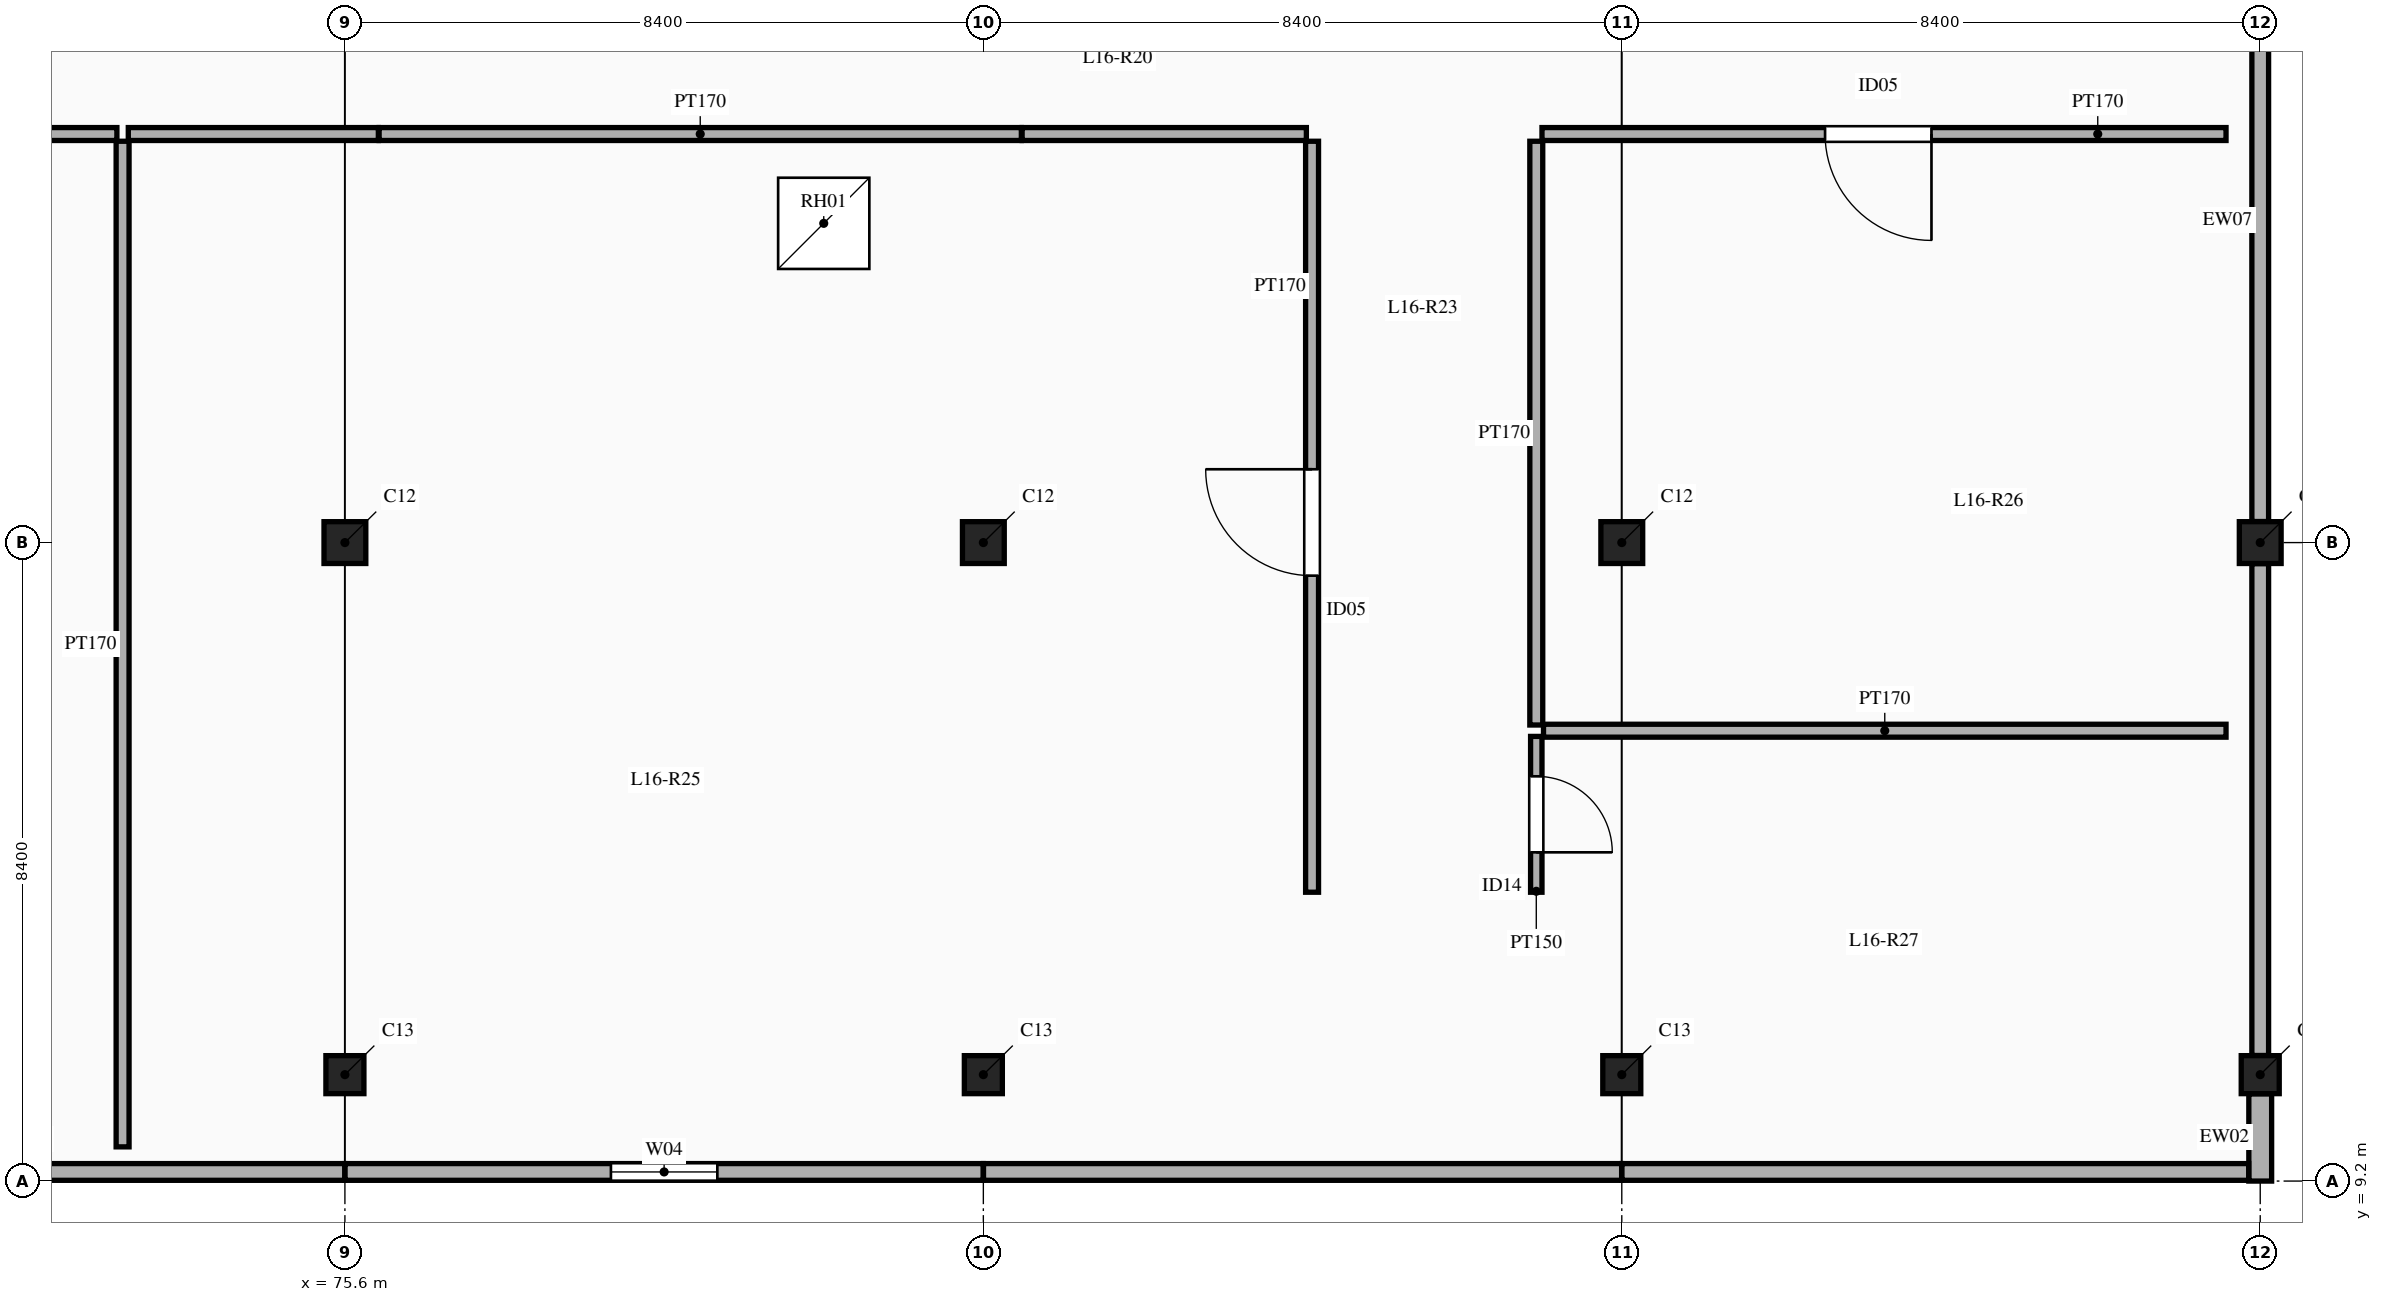
"""IFC4 building model, lengths in metres.
Left out: names, types, materials, properties, quantities, classifications, styles, units other than length and angle.
Written with IfcOpenShell. Run it as: python <this file> out.ifc"""

import sys

from ifc_helpers import new_model, si_unit, direction, frame, frame_2d, origin, origin_2d, place, context, subcontext, project, spatial, rectangle, extrude, element, fill, save


model = new_model("IFC4")
c1 = context("Model", 3, precision=1e-05, world=origin(), true_north=direction((0.0, 1.0)))
c2 = subcontext(c1, "Body", "Model", "MODEL_VIEW")
j1 = project(units=[si_unit("LENGTHUNIT", "METRE"), si_unit("PLANEANGLEUNIT", "RADIAN")], contexts=[c1])
p1 = place(None, origin())
s1 = spatial("IfcSite", under=j1, at=p1, CompositionType="ELEMENT")
p2 = place(p1, origin())
s2 = spatial("IfcBuilding", under=s1, at=p2, CompositionType="ELEMENT")
p3 = place(p2, frame((0.0, 0.0, 73.5)))
s3 = spatial("IfcBuildingStorey", under=s2, at=p3, CompositionType="ELEMENT", Elevation=73.5)
p4 = place(p3, frame((75.6, 10.6, 0.0), z_axis=(0.0, 0.0, 1.0), x_axis=(1.0, 0.0, 0.0)))
e1 = element("IfcColumn", 1, at=p4, inside=s3, PredefinedType="COLUMN", context=c2, shape_type="SweptSolid", body=[
    extrude(rectangle(XDim=0.5, YDim=0.5, at=origin_2d()), origin(), (0.0, 0.0, 1.0), 4.5),
])
p5 = place(p3, frame((75.6, 17.6, 0.0), z_axis=(0.0, 0.0, 1.0), x_axis=(1.0, 0.0, 0.0)))
e2 = element("IfcColumn", 2, at=p5, inside=s3, PredefinedType="COLUMN", context=c2, shape_type="SweptSolid", body=[
    extrude(rectangle(XDim=0.55, YDim=0.55, at=origin_2d()), origin(), (0.0, 0.0, 1.0), 4.5),
])
p6 = place(p3, frame((84.0, 10.6, 0.0), z_axis=(0.0, 0.0, 1.0), x_axis=(1.0, 0.0, 0.0)))
e3 = element("IfcColumn", 3, at=p6, inside=s3, PredefinedType="COLUMN", context=c2, shape_type="SweptSolid", body=[
    extrude(rectangle(XDim=0.5, YDim=0.5, at=origin_2d()), origin(), (0.0, 0.0, 1.0), 4.5),
])
p7 = place(p3, frame((84.0, 17.6, 0.0), z_axis=(0.0, 0.0, 1.0), x_axis=(1.0, 0.0, 0.0)))
e4 = element("IfcColumn", 4, at=p7, inside=s3, PredefinedType="COLUMN", context=c2, shape_type="SweptSolid", body=[
    extrude(rectangle(XDim=0.55, YDim=0.55, at=origin_2d()), origin(), (0.0, 0.0, 1.0), 4.5),
])
p8 = place(p3, frame((92.4, 10.6, 0.0), z_axis=(0.0, 0.0, 1.0), x_axis=(1.0, 0.0, 0.0)))
e5 = element("IfcColumn", 5, at=p8, inside=s3, PredefinedType="COLUMN", context=c2, shape_type="SweptSolid", body=[
    extrude(rectangle(XDim=0.5, YDim=0.5, at=origin_2d()), origin(), (0.0, 0.0, 1.0), 4.5),
])
p9 = place(p3, frame((92.4, 17.6, 0.0), z_axis=(0.0, 0.0, 1.0), x_axis=(1.0, 0.0, 0.0)))
e6 = element("IfcColumn", 6, at=p9, inside=s3, PredefinedType="COLUMN", context=c2, shape_type="SweptSolid", body=[
    extrude(rectangle(XDim=0.55, YDim=0.55, at=origin_2d()), origin(), (0.0, 0.0, 1.0), 4.5),
])
p10 = place(p3, frame((100.8, 10.6, 0.0), z_axis=(0.0, 0.0, 1.0), x_axis=(1.0, 0.0, 0.0)))
e7 = element("IfcColumn", 7, at=p10, inside=s3, PredefinedType="COLUMN", context=c2, shape_type="SweptSolid", body=[
    extrude(rectangle(XDim=0.5, YDim=0.5, at=origin_2d()), origin(), (0.0, 0.0, 1.0), 4.5),
])
p11 = place(p3, frame((100.8, 17.6, 0.0), z_axis=(0.0, 0.0, 1.0), x_axis=(1.0, 0.0, 0.0)))
e8 = element("IfcColumn", 8, at=p11, inside=s3, PredefinedType="COLUMN", context=c2, shape_type="SweptSolid", body=[
    extrude(rectangle(XDim=0.55, YDim=0.55, at=origin_2d()), origin(), (0.0, 0.0, 1.0), 4.5),
])
p12 = place(p3, frame((100.8, 9.2, 0.0), z_axis=(0.0, 0.0, 1.0), x_axis=(0.0, 1.0, 0.0)))
e9 = element("IfcWall", 9, at=p12, inside=s3, PredefinedType="SOLIDWALL", context=c2, shape_type="SweptSolid", body=[
    extrude(rectangle(XDim=1.148, YDim=0.3, at=frame_2d((0.574, 0.0))), origin(), (0.0, 0.0, 1.0), 3.55),
])
p13 = place(p3, frame((67.202, 9.32, 0.0), z_axis=(0.0, 0.0, 1.0), x_axis=(1.0, 0.0, 0.0)))
e10 = element("IfcWall", 10, at=p13, inside=s3, PredefinedType="USERDEFINED", context=c2, shape_type="SweptSolid", body=[
    extrude(rectangle(XDim=8.396, YDim=0.22, at=frame_2d((4.198, 0.0))), origin(), (0.0, 0.0, 1.0), 3.55),
])
p14 = place(p3, frame((75.602, 9.32, 0.0), z_axis=(0.0, 0.0, 1.0), x_axis=(1.0, 0.0, 0.0)))
e11 = element("IfcWall", 11, at=p14, inside=s3, PredefinedType="USERDEFINED", context=c2, shape_type="SweptSolid", body=[
    extrude(rectangle(XDim=8.396, YDim=0.22, at=frame_2d((4.198, 0.0))), origin(), (0.0, 0.0, 1.0), 3.55),
])
p15 = place(p14, frame((3.498, 0.0, 1.1)))
e12 = element("IfcOpeningElement", 12, at=p15, cuts=e11, PredefinedType="OPENING", context=c2, shape_type="SweptSolid", body=[
    extrude(rectangle(XDim=1.4, YDim=1.4, at=frame_2d((0.7, 0.7))), frame((0.0, 0.12, 0.0), z_axis=(0.0, -1.0, 0.0), x_axis=(1.0, 0.0, 0.0)), (0.0, 0.0, 1.0), 0.24),
])
p16 = place(p3, frame((84.002, 9.32, 0.0), z_axis=(0.0, 0.0, 1.0), x_axis=(1.0, 0.0, 0.0)))
e13 = element("IfcWall", 13, at=p16, inside=s3, PredefinedType="USERDEFINED", context=c2, shape_type="SweptSolid", body=[
    extrude(rectangle(XDim=8.396, YDim=0.22, at=frame_2d((4.198, 0.0))), origin(), (0.0, 0.0, 1.0), 3.55),
])
p17 = place(p3, frame((92.402, 9.32, 0.0), z_axis=(0.0, 0.0, 1.0), x_axis=(1.0, 0.0, 0.0)))
e14 = element("IfcWall", 14, at=p17, inside=s3, PredefinedType="USERDEFINED", context=c2, shape_type="SweptSolid", body=[
    extrude(rectangle(XDim=8.246, YDim=0.22, at=frame_2d((4.123, 0.0))), origin(), (0.0, 0.0, 1.0), 3.55),
])
p18 = place(p3, frame((100.8, 10.852, 0.0), z_axis=(0.0, 0.0, 1.0), x_axis=(0.0, 1.0, 0.0)))
e15 = element("IfcWall", 15, at=p18, inside=s3, PredefinedType="USERDEFINED", context=c2, shape_type="SweptSolid", body=[
    extrude(rectangle(XDim=6.471, YDim=0.22, at=frame_2d((3.235, 0.0))), origin(), (0.0, 0.0, 1.0), 3.55),
])
p19 = place(p3, frame((100.8, 17.877, 0.0), z_axis=(0.0, 0.0, 1.0), x_axis=(0.0, 1.0, 0.0)))
e16 = element("IfcWall", 16, at=p19, inside=s3, PredefinedType="USERDEFINED", context=c2, shape_type="SweptSolid", body=[
    extrude(rectangle(XDim=7.921, YDim=0.22, at=frame_2d((3.96, 0.0))), origin(), (0.0, 0.0, 1.0), 3.55),
])
p20 = place(p3, frame((76.05, 22.975, 0.0), z_axis=(0.0, 0.0, 1.0), x_axis=(1.0, 0.0, 0.0)))
e17 = element("IfcWall", 17, at=p20, inside=s3, PredefinedType="PARTITIONING", context=c2, shape_type="SweptSolid", body=[
    extrude(rectangle(XDim=8.45, YDim=0.17, at=frame_2d((4.225, 0.0))), origin(), (0.0, 0.0, 1.0), 3.45),
])
p21 = place(p3, frame((84.51, 22.975, 0.0), z_axis=(0.0, 0.0, 1.0), x_axis=(1.0, 0.0, 0.0)))
e18 = element("IfcWall", 18, at=p21, inside=s3, PredefinedType="PARTITIONING", context=c2, shape_type="SweptSolid", body=[
    extrude(rectangle(XDim=3.74, YDim=0.17, at=frame_2d((1.87, 0.0))), origin(), (0.0, 0.0, 1.0), 3.45),
])
p22 = place(p3, frame((59.25, 22.975, 0.0), z_axis=(0.0, 0.0, 1.0), x_axis=(1.0, 0.0, 0.0)))
e19 = element("IfcWall", 19, at=p22, inside=s3, PredefinedType="PARTITIONING", context=c2, shape_type="SweptSolid", body=[
    extrude(rectangle(XDim=13.35, YDim=0.17, at=frame_2d((6.675, 0.0))), origin(), (0.0, 0.0, 1.0), 3.45),
])
p23 = place(p22, frame((5.222, 0.0, 0.0)))
e20 = element("IfcOpeningElement", 20, at=p23, cuts=e19, PredefinedType="OPENING", context=c2, shape_type="SweptSolid", body=[
    extrude(rectangle(XDim=1.4, YDim=2.25, at=frame_2d((0.7, 1.125))), frame((0.0, 0.095, 0.0), z_axis=(0.0, -1.0, 0.0), x_axis=(1.0, 0.0, 0.0)), (0.0, 0.0, 1.0), 0.19),
])
p24 = place(p3, frame((72.75, 22.975, 0.0), z_axis=(0.0, 0.0, 1.0), x_axis=(1.0, 0.0, 0.0)))
e21 = element("IfcWall", 21, at=p24, inside=s3, PredefinedType="PARTITIONING", context=c2, shape_type="SweptSolid", body=[
    extrude(rectangle(XDim=3.29, YDim=0.17, at=frame_2d((1.645, 0.0))), origin(), (0.0, 0.0, 1.0), 3.45),
])
p25 = place(p3, frame((91.35, 22.975, 0.0), z_axis=(0.0, 0.0, 1.0), x_axis=(1.0, 0.0, 0.0)))
e22 = element("IfcWall", 22, at=p25, inside=s3, PredefinedType="PARTITIONING", context=c2, shape_type="SweptSolid", body=[
    extrude(rectangle(XDim=9.0, YDim=0.17, at=frame_2d((4.5, 0.0))), origin(), (0.0, 0.0, 1.0), 3.45),
])
p26 = place(p25, frame((3.725, 0.0, 0.0)))
e23 = element("IfcOpeningElement", 23, at=p26, cuts=e22, PredefinedType="OPENING", context=c2, shape_type="SweptSolid", body=[
    extrude(rectangle(XDim=1.4, YDim=2.25, at=frame_2d((0.7, 1.125))), frame((0.0, 0.095, 0.0), z_axis=(0.0, -1.0, 0.0), x_axis=(1.0, 0.0, 0.0)), (0.0, 0.0, 1.0), 0.19),
])
p27 = place(p3, frame((88.325, 13.0, 0.0), z_axis=(0.0, 0.0, 1.0), x_axis=(0.0, 1.0, 0.0)))
e24 = element("IfcWall", 24, at=p27, inside=s3, PredefinedType="PARTITIONING", context=c2, shape_type="SweptSolid", body=[
    extrude(rectangle(XDim=9.88, YDim=0.17, at=frame_2d((4.94, 0.0))), origin(), (0.0, 0.0, 1.0), 3.45),
])
p28 = place(p27, frame((4.165, 0.0, 0.0)))
e25 = element("IfcOpeningElement", 25, at=p28, cuts=e24, PredefinedType="OPENING", context=c2, shape_type="SweptSolid", body=[
    extrude(rectangle(XDim=1.4, YDim=2.25, at=frame_2d((0.7, 1.125))), frame((0.0, 0.095, 0.0), z_axis=(0.0, -1.0, 0.0), x_axis=(1.0, 0.0, 0.0)), (0.0, 0.0, 1.0), 0.19),
])
p29 = place(p3, frame((91.275, 15.2, 0.0), z_axis=(0.0, 0.0, 1.0), x_axis=(0.0, 1.0, 0.0)))
e26 = element("IfcWall", 26, at=p29, inside=s3, PredefinedType="PARTITIONING", context=c2, shape_type="SweptSolid", body=[
    extrude(rectangle(XDim=7.68, YDim=0.17, at=frame_2d((3.84, 0.0))), origin(), (0.0, 0.0, 1.0), 3.45),
])
p30 = place(p3, frame((91.275, 13.0, 0.0), z_axis=(0.0, 0.0, 1.0), x_axis=(0.0, 1.0, 0.0)))
e27 = element("IfcWall", 27, at=p30, inside=s3, PredefinedType="PARTITIONING", context=c2, shape_type="SweptSolid", body=[
    extrude(rectangle(XDim=2.05, YDim=0.15, at=frame_2d((1.025, 0.0))), origin(), (0.0, 0.0, 1.0), 3.45),
])
p31 = place(p30, frame((0.525, 0.0, 0.0)))
e28 = element("IfcOpeningElement", 28, at=p31, cuts=e27, PredefinedType="OPENING", context=c2, shape_type="SweptSolid", body=[
    extrude(rectangle(XDim=1.0, YDim=2.15, at=frame_2d((0.5, 1.075))), frame((0.0, 0.085, 0.0), z_axis=(0.0, -1.0, 0.0), x_axis=(1.0, 0.0, 0.0)), (0.0, 0.0, 1.0), 0.17),
])
p32 = place(p3, frame((72.675, 9.65, 0.0), z_axis=(0.0, 0.0, 1.0), x_axis=(0.0, 1.0, 0.0)))
e29 = element("IfcWall", 29, at=p32, inside=s3, PredefinedType="PARTITIONING", context=c2, shape_type="SweptSolid", body=[
    extrude(rectangle(XDim=13.23, YDim=0.17, at=frame_2d((6.615, 0.0))), origin(), (0.0, 0.0, 1.0), 3.45),
])
p33 = place(p3, frame((91.37, 15.125, 0.0), z_axis=(0.0, 0.0, 1.0), x_axis=(1.0, 0.0, 0.0)))
e30 = element("IfcWall", 30, at=p33, inside=s3, PredefinedType="PARTITIONING", context=c2, shape_type="SweptSolid", body=[
    extrude(rectangle(XDim=8.98, YDim=0.17, at=frame_2d((4.49, 0.0))), origin(), (0.0, 0.0, 1.0), 3.45),
])
p34 = place(p15, origin())
e31 = element("IfcWindow", 31, at=p34, inside=s3, PartitioningType="SINGLE_PANEL", PredefinedType="LIGHTDOME", context=c2, shape_type="SweptSolid", body=[
    extrude(rectangle(XDim=1.4, YDim=1.4, at=frame_2d((0.7, 0.7))), frame((0.0, 0.03, 0.0), z_axis=(0.0, -1.0, 0.0), x_axis=(1.0, 0.0, 0.0)), (0.0, 0.0, 1.0), 0.06),
])
fill(e12, e31)
p35 = place(p2, frame((0.0, 0.0, 78.0)))
p36 = place(p35, frame((0.0, 0.0, -0.23)))
p37 = place(p36, frame((81.9, 21.8, 0.0)))
p38 = place(p37, frame((0.0, 0.0, 0.18)))
e32 = element("IfcWindow", 32, at=p38, inside=s3, PartitioningType="SINGLE_PANEL", PredefinedType="SKYLIGHT", context=c2, shape_type="SweptSolid", body=[
    extrude(rectangle(XDim=1.2, YDim=1.2, at=origin_2d()), origin(), (0.0, 0.0, 1.0), 0.05),
])
p39 = place(p28, origin())
e33 = element("IfcDoor", 33, at=p39, inside=s3, OperationType="SINGLE_SWING_RIGHT", PredefinedType="DOOR", context=c2, shape_type="SweptSolid", body=[
    extrude(rectangle(XDim=1.4, YDim=2.25, at=frame_2d((0.7, 1.125))), frame((0.0, 0.025, 0.0), z_axis=(0.0, -1.0, 0.0), x_axis=(1.0, 0.0, 0.0)), (0.0, 0.0, 1.0), 0.05),
])
fill(e25, e33)
p40 = place(p26, frame((1.4, 0.0, 0.0), z_axis=(0.0, 0.0, 1.0), x_axis=(-1.0, 0.0, 0.0)))
e34 = element("IfcDoor", 34, at=p40, inside=s3, OperationType="SINGLE_SWING_LEFT", PredefinedType="DOOR", context=c2, shape_type="SweptSolid", body=[
    extrude(rectangle(XDim=1.4, YDim=2.25, at=frame_2d((0.7, 1.125))), frame((0.0, 0.025, 0.0), z_axis=(0.0, -1.0, 0.0), x_axis=(1.0, 0.0, 0.0)), (0.0, 0.0, 1.0), 0.05),
])
fill(e23, e34)
p41 = place(p31, frame((1.0, 0.0, 0.0), z_axis=(0.0, 0.0, 1.0), x_axis=(-1.0, 0.0, 0.0)))
e35 = element("IfcDoor", 35, at=p41, inside=s3, OperationType="SINGLE_SWING_RIGHT", PredefinedType="DOOR", context=c2, shape_type="SweptSolid", body=[
    extrude(rectangle(XDim=1.0, YDim=2.15, at=frame_2d((0.5, 1.075))), frame((0.0, 0.025, 0.0), z_axis=(0.0, -1.0, 0.0), x_axis=(1.0, 0.0, 0.0)), (0.0, 0.0, 1.0), 0.05),
])
fill(e28, e35)
save(model, sys.argv[1])
